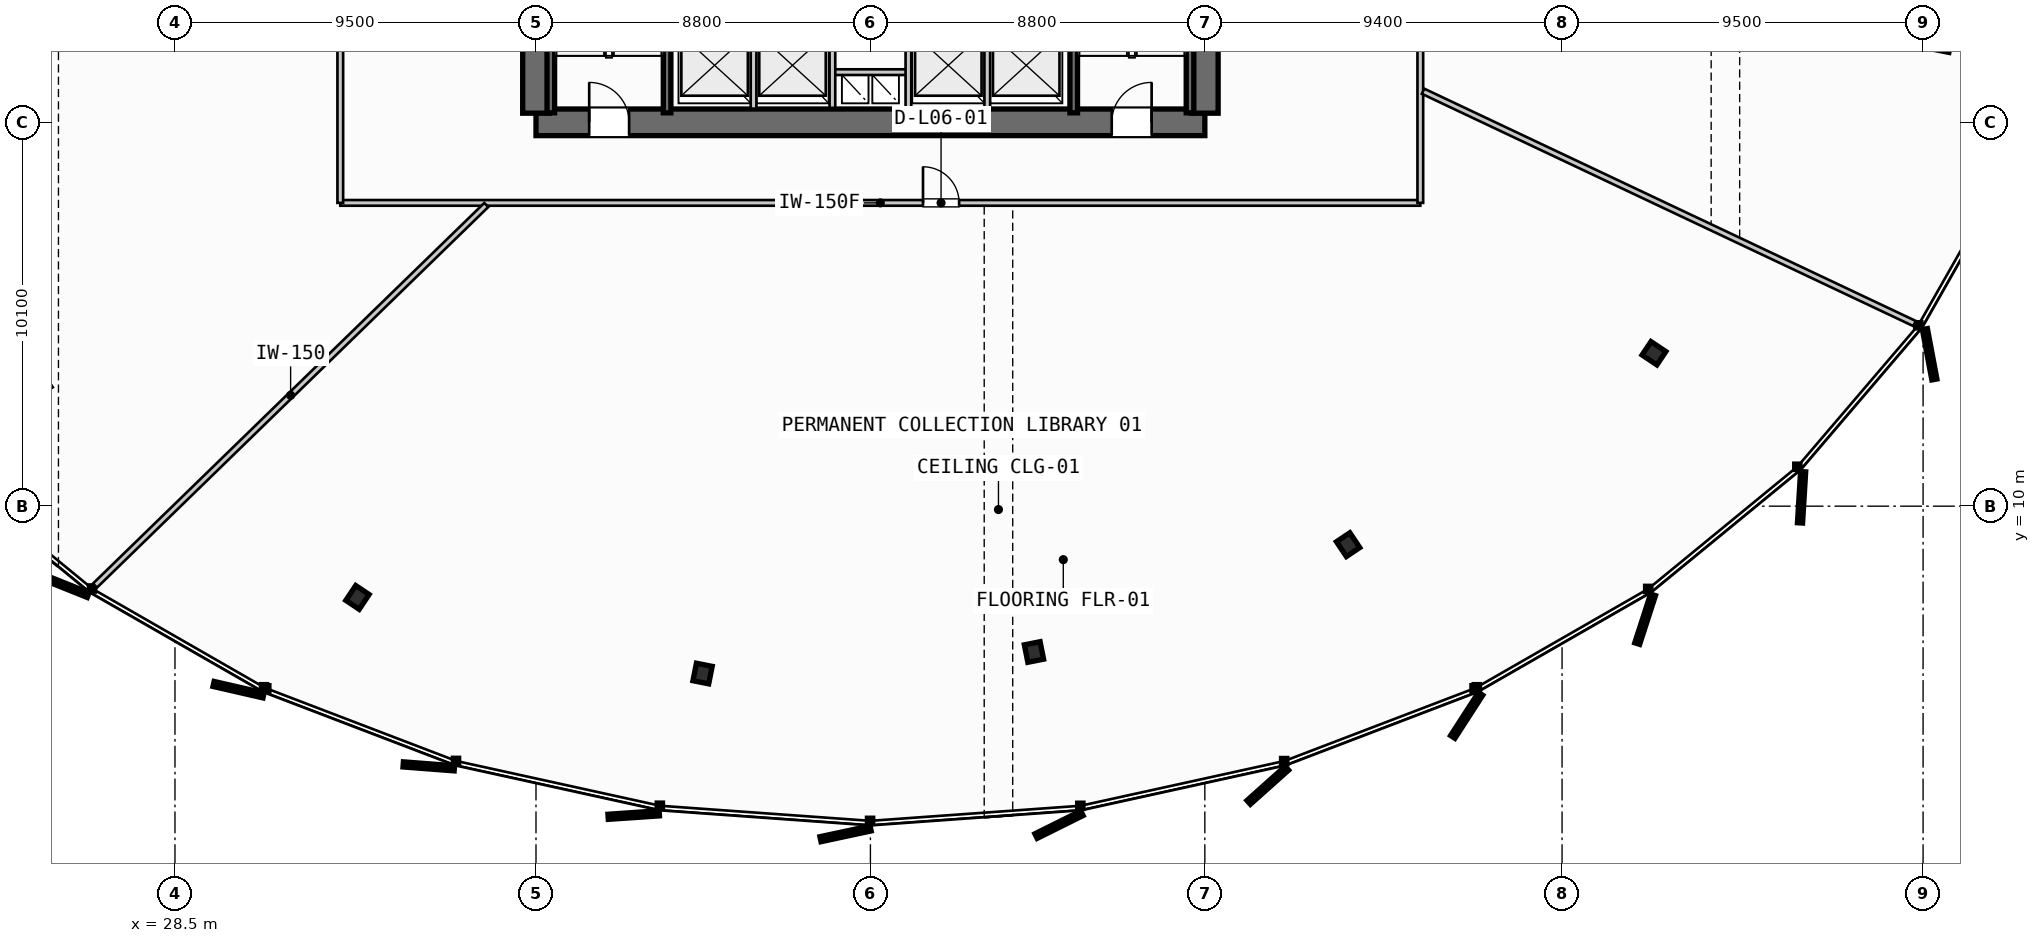
"""IFC4 building model, lengths in metres.
Left out: names, types, materials, properties, quantities, classifications, styles, units other than length and angle.
Written with IfcOpenShell. Run it as: python <this file> out.ifc"""

import sys

from ifc_helpers import new_model, si_unit, direction, frame, frame_2d, origin, origin_2d, place, context, subcontext, project, spatial, rectangle, i_section, extrude, source, transform, mapped, element, fill, save


model = new_model("IFC4")
c1 = context("Model", 3, precision=1e-05, world=origin(), true_north=direction((0.0, 1.0)))
c2 = subcontext(c1, "Body", "Model", "MODEL_VIEW")
j1 = project(units=[si_unit("LENGTHUNIT", "METRE"), si_unit("PLANEANGLEUNIT", "RADIAN")], contexts=[c1])
p1 = place(None, origin())
s1 = spatial("IfcSite", under=j1, at=p1, CompositionType="ELEMENT")
p2 = place(p1, origin())
s2 = spatial("IfcBuilding", under=s1, at=p2, CompositionType="ELEMENT")
p3 = place(p2, frame((0.0, 0.0, 29.6)))
s3 = spatial("IfcBuildingStorey", under=s2, at=p3, CompositionType="ELEMENT", Elevation=29.6)
p4 = place(p3, frame((38.0, 20.1, 0.0), z_axis=(0.0, 0.0, 1.0), x_axis=(1.0, 0.0, 0.0)))
e1 = element("IfcWall", 1, at=p4, inside=s3, PredefinedType="SHEAR", context=c2, shape_type="SweptSolid", body=[
    extrude(rectangle(XDim=17.6, YDim=0.7, at=frame_2d((8.8, 0.0))), origin(), (0.0, 0.0, 1.0), 3.55),
])
p5 = place(p4, frame((1.4, 0.0, 0.0)))
e2 = element("IfcOpeningElement", 2, at=p5, cuts=e1, PredefinedType="OPENING", context=c2, shape_type="SweptSolid", body=[
    extrude(rectangle(XDim=1.05, YDim=2.15, at=frame_2d((0.525, 1.075))), frame((0.0, 0.36, 0.0), z_axis=(0.0, -1.0, 0.0), x_axis=(1.0, 0.0, 0.0)), (0.0, 0.0, 1.0), 0.72),
])
p6 = place(p4, frame((15.15, 0.0, 0.0)))
e3 = element("IfcOpeningElement", 3, at=p6, cuts=e1, PredefinedType="OPENING", context=c2, shape_type="SweptSolid", body=[
    extrude(rectangle(XDim=1.05, YDim=2.15, at=frame_2d((0.525, 1.075))), frame((0.0, 0.36, 0.0), z_axis=(0.0, -1.0, 0.0), x_axis=(1.0, 0.0, 0.0)), (0.0, 0.0, 1.0), 0.72),
])
p7 = place(p3, frame((38.0, 35.26, 0.0), z_axis=(0.0, 0.0, 1.0), x_axis=(0.0, -1.0, 0.0)))
e4 = element("IfcWall", 4, at=p7, inside=s3, PredefinedType="SHEAR", context=c2, shape_type="SweptSolid", body=[
    extrude(rectangle(XDim=14.92, YDim=0.7, at=frame_2d((7.46, 0.0))), origin(), (0.0, 0.0, 1.0), 3.55),
])
p8 = place(p7, frame((5.21, 0.0, 0.0)))
e5 = element("IfcOpeningElement", 5, at=p8, cuts=e4, PredefinedType="OPENING", context=c2, shape_type="SweptSolid", body=[
    extrude(rectangle(XDim=1.1, YDim=2.2, at=frame_2d((0.55, 1.1))), frame((0.0, 0.36, 0.0), z_axis=(0.0, -1.0, 0.0), x_axis=(1.0, 0.0, 0.0)), (0.0, 0.0, 1.0), 0.72),
])
p9 = place(p3, frame((55.6, 20.34, 0.0), z_axis=(0.0, 0.0, 1.0), x_axis=(0.0, 1.0, 0.0)))
e6 = element("IfcWall", 6, at=p9, inside=s3, PredefinedType="SHEAR", context=c2, shape_type="SweptSolid", body=[
    extrude(rectangle(XDim=14.92, YDim=0.7, at=frame_2d((7.46, 0.0))), origin(), (0.0, 0.0, 1.0), 3.55),
])
p10 = place(p9, frame((12.71, 0.0, 0.0)))
e7 = element("IfcOpeningElement", 7, at=p10, cuts=e6, PredefinedType="OPENING", context=c2, shape_type="SweptSolid", body=[
    extrude(rectangle(XDim=1.05, YDim=2.15, at=frame_2d((0.525, 1.075))), frame((0.0, 0.36, 0.0), z_axis=(0.0, -1.0, 0.0), x_axis=(1.0, 0.0, 0.0)), (0.0, 0.0, 1.0), 0.72),
])
p11 = place(p9, frame((8.61, 0.0, 0.0)))
e8 = element("IfcOpeningElement", 8, at=p11, cuts=e6, PredefinedType="OPENING", context=c2, shape_type="SweptSolid", body=[
    extrude(rectangle(XDim=1.1, YDim=2.2, at=frame_2d((0.55, 1.1))), frame((0.0, 0.36, 0.0), z_axis=(0.0, -1.0, 0.0), x_axis=(1.0, 0.0, 0.0)), (0.0, 0.0, 1.0), 0.72),
])
m1 = source(origin(), c2, "Body", "SweptSolid", [
    extrude(i_section(OverallWidth=0.423, OverallDepth=0.469, WebThickness=0.051, FlangeThickness=0.081, FilletRadius=0.015, at=origin_2d()), origin(), (0.0, 0.0, 1.0), 3.55),
])
for number, where, z_axis, x_axis in (
    (9, (33.302, 7.599, 0.0), (0.0, 0.0, 1.0), (-0.556, -0.831, 0.0)),
    (10, (42.383, 5.596, 0.0), (0.0, 0.0, 1.0), (-0.195, -0.981, 0.0)),
    (11, (51.104, 6.163, 0.0), (0.0, 0.0, 1.0), (0.195, -0.981, 0.0)),
    (12, (59.37, 8.987, 0.0), (0.0, 0.0, 1.0), (0.556, -0.831, 0.0)),
    (13, (67.418, 14.023, 0.0), (0.0, 0.0, 1.0), (0.831, -0.556, 0.0)),
    (14, (74.991, 22.192, 0.0), (0.0, 0.0, 1.0), (0.981, -0.195, 0.0)),
):
    element("IfcColumn", number, at=place(p3, frame(where, z_axis=z_axis, x_axis=x_axis)), inside=s3, PredefinedType="COLUMN", context=c2, shape_type="MappedRepresentation", body=[
        mapped(m1, transform((0.0, 0.0, 0.0), scale=1.0)),
    ])
for number, where, z_axis, x_axis in (
    (15, (41.45, 27.7, 0.0), (0.0, 0.0, 1.0), (0.0, -1.0, 0.0)),
    (16, (38.39, 20.35, 0.0), (0.0, 0.0, 1.0), (0.0, 1.0, 0.0)),
    (17, (55.21, 27.7, 0.0), (0.0, 0.0, 1.0), (0.0, -1.0, 0.0)),
    (18, (52.15, 20.35, 0.0), (0.0, 0.0, 1.0), (0.0, 1.0, 0.0)),
):
    element("IfcWall", number, at=place(p3, frame(where, z_axis=z_axis, x_axis=x_axis)), inside=s3, PredefinedType="SHEAR", context=c2, shape_type="SweptSolid", body=[
        extrude(rectangle(XDim=7.35, YDim=0.2, at=frame_2d((3.675, 0.0))), origin(), (0.0, 0.0, 1.0), 3.55),
    ])
p12 = place(p3, frame((45.8, 21.42, 0.0), z_axis=(0.0, 0.0, 1.0), x_axis=(1.0, 0.0, 0.0)))
e19 = element("IfcWall", 19, at=p12, inside=s3, PredefinedType="PARTITIONING", context=c2, shape_type="SweptSolid", body=[
    extrude(rectangle(XDim=2.0, YDim=0.15, at=frame_2d((1.0, 0.0))), origin(), (0.0, 0.0, 1.0), 2.925),
])
for number, where, z_axis, x_axis in (
    (20, (45.8, 20.48, 0.0), (0.0, 0.0, 1.0), (0.0, 1.0, 0.0)),
    (21, (47.8, 20.48, 0.0), (0.0, 0.0, 1.0), (0.0, 1.0, 0.0)),
):
    element("IfcWall", number, at=place(p3, frame(where, z_axis=z_axis, x_axis=x_axis)), inside=s3, PredefinedType="PARTITIONING", context=c2, shape_type="SweptSolid", body=[
        extrude(rectangle(XDim=2.24, YDim=0.15, at=frame_2d((1.12, 0.0))), origin(), (0.0, 0.0, 1.0), 2.925),
    ])
for number, where, z_axis, x_axis in (
    (22, (43.725, 20.46, 0.0), (0.0, 0.0, 1.0), (0.0, 1.0, 0.0)),
    (23, (49.875, 20.46, 0.0), (0.0, 0.0, 1.0), (0.0, 1.0, 0.0)),
):
    element("IfcWall", number, at=place(p3, frame(where, z_axis=z_axis, x_axis=x_axis)), inside=s3, PredefinedType="PARTITIONING", context=c2, shape_type="SweptSolid", body=[
        extrude(rectangle(XDim=2.27, YDim=0.15, at=frame_2d((1.135, 0.0))), origin(), (0.0, 0.0, 1.0), 2.925),
    ])
p13 = place(p3, frame((32.85, 17.98, 0.0), z_axis=(0.0, 0.0, 1.0), x_axis=(1.0, 0.0, 0.0)))
e24 = element("IfcWall", 24, at=p13, inside=s3, PredefinedType="PARTITIONING", context=c2, shape_type="SweptSolid", body=[
    extrude(rectangle(XDim=28.42, YDim=0.15, at=frame_2d((14.21, 0.0))), origin(), (0.0, 0.0, 1.0), 2.925),
])
p14 = place(p13, frame((15.334, 0.0, 0.0)))
e25 = element("IfcOpeningElement", 25, at=p14, cuts=e24, PredefinedType="OPENING", context=c2, shape_type="SweptSolid", body=[
    extrude(rectangle(XDim=0.95, YDim=2.15, at=frame_2d((0.475, 1.075))), frame((0.0, 0.085, 0.0), z_axis=(0.0, -1.0, 0.0), x_axis=(1.0, 0.0, 0.0)), (0.0, 0.0, 1.0), 0.17),
])
p15 = place(p3, frame((61.27, 17.98, 0.0), z_axis=(0.0, 0.0, 1.0), x_axis=(0.0, 1.0, 0.0)))
e26 = element("IfcWall", 26, at=p15, inside=s3, PredefinedType="PARTITIONING", context=c2, shape_type="SweptSolid", body=[
    extrude(rectangle(XDim=20.06, YDim=0.15, at=frame_2d((10.03, 0.0))), origin(), (0.0, 0.0, 1.0), 2.925),
])
p16 = place(p15, frame((10.736, 0.0, 0.0)))
e27 = element("IfcOpeningElement", 27, at=p16, cuts=e26, PredefinedType="OPENING", context=c2, shape_type="SweptSolid", body=[
    extrude(rectangle(XDim=0.95, YDim=2.15, at=frame_2d((0.475, 1.075))), frame((0.0, 0.085, 0.0), z_axis=(0.0, -1.0, 0.0), x_axis=(1.0, 0.0, 0.0)), (0.0, 0.0, 1.0), 0.17),
])
p17 = place(p3, frame((32.85, 38.04, 0.0), z_axis=(0.0, 0.0, 1.0), x_axis=(0.0, -1.0, 0.0)))
e28 = element("IfcWall", 28, at=p17, inside=s3, PredefinedType="PARTITIONING", context=c2, shape_type="SweptSolid", body=[
    extrude(rectangle(XDim=20.06, YDim=0.15, at=frame_2d((10.03, 0.0))), origin(), (0.0, 0.0, 1.0), 2.925),
])
p18 = place(p17, frame((9.555, 0.0, 0.0)))
e29 = element("IfcOpeningElement", 29, at=p18, cuts=e28, PredefinedType="OPENING", context=c2, shape_type="SweptSolid", body=[
    extrude(rectangle(XDim=0.95, YDim=2.15, at=frame_2d((0.475, 1.075))), frame((0.0, 0.085, 0.0), z_axis=(0.0, -1.0, 0.0), x_axis=(1.0, 0.0, 0.0)), (0.0, 0.0, 1.0), 0.17),
])
p19 = place(p3, frame((36.691, 17.924, 0.0), z_axis=(0.0, 0.0, 1.0), x_axis=(-0.716863458564, -0.697213584044, 0.0)))
e30 = element("IfcWall", 30, at=p19, inside=s3, PredefinedType="PARTITIONING", context=c2, shape_type="SweptSolid", body=[
    extrude(rectangle(XDim=14.363, YDim=0.15, at=frame_2d((7.181, 0.0))), origin(), (0.0, 0.0, 1.0), 2.925),
])
p20 = place(p3, frame((61.342, 20.917, 0.0), z_axis=(0.0, 0.0, 1.0), x_axis=(0.904140604409, -0.427235026021, 0.0)))
e31 = element("IfcWall", 31, at=p20, inside=s3, PredefinedType="PARTITIONING", context=c2, shape_type="SweptSolid", body=[
    extrude(rectangle(XDim=14.303, YDim=0.15, at=frame_2d((7.152, 0.0))), origin(), (0.0, 0.0, 1.0), 2.925),
])
m2 = source(origin(), c2, "Body", "SweptSolid", [
    extrude(rectangle(XDim=1.05, YDim=2.15, at=frame_2d((0.525, 1.075))), frame((0.0, 0.025, 0.0), z_axis=(0.0, -1.0, 0.0), x_axis=(1.0, 0.0, 0.0)), (0.0, 0.0, 1.0), 0.05),
])
p21 = place(p5, origin())
e32 = element("IfcDoor", 32, at=p21, inside=s3, OperationType="SINGLE_SWING_LEFT", PredefinedType="DOOR", context=c2, shape_type="MappedRepresentation", body=[
    mapped(m2, transform((0.0, 0.0, 0.0), scale=1.0)),
])
fill(e2, e32)
p22 = place(p6, origin())
e33 = element("IfcDoor", 33, at=p22, inside=s3, OperationType="SINGLE_SWING_RIGHT", PredefinedType="DOOR", context=c2, shape_type="MappedRepresentation", body=[
    mapped(m2, transform((0.0, 0.0, 0.0), scale=1.0)),
])
fill(e3, e33)
m3 = source(origin(), c2, "Body", "SweptSolid", [
    extrude(rectangle(XDim=0.95, YDim=2.15, at=frame_2d((0.475, 1.075))), frame((0.0, 0.025, 0.0), z_axis=(0.0, -1.0, 0.0), x_axis=(1.0, 0.0, 0.0)), (0.0, 0.0, 1.0), 0.05),
])
p23 = place(p14, origin())
e34 = element("IfcDoor", 34, at=p23, inside=s3, OperationType="SINGLE_SWING_LEFT", PredefinedType="DOOR", context=c2, shape_type="MappedRepresentation", body=[
    mapped(m3, transform((0.0, 0.0, 0.0), scale=1.0)),
])
fill(e25, e34)
save(model, sys.argv[1])
